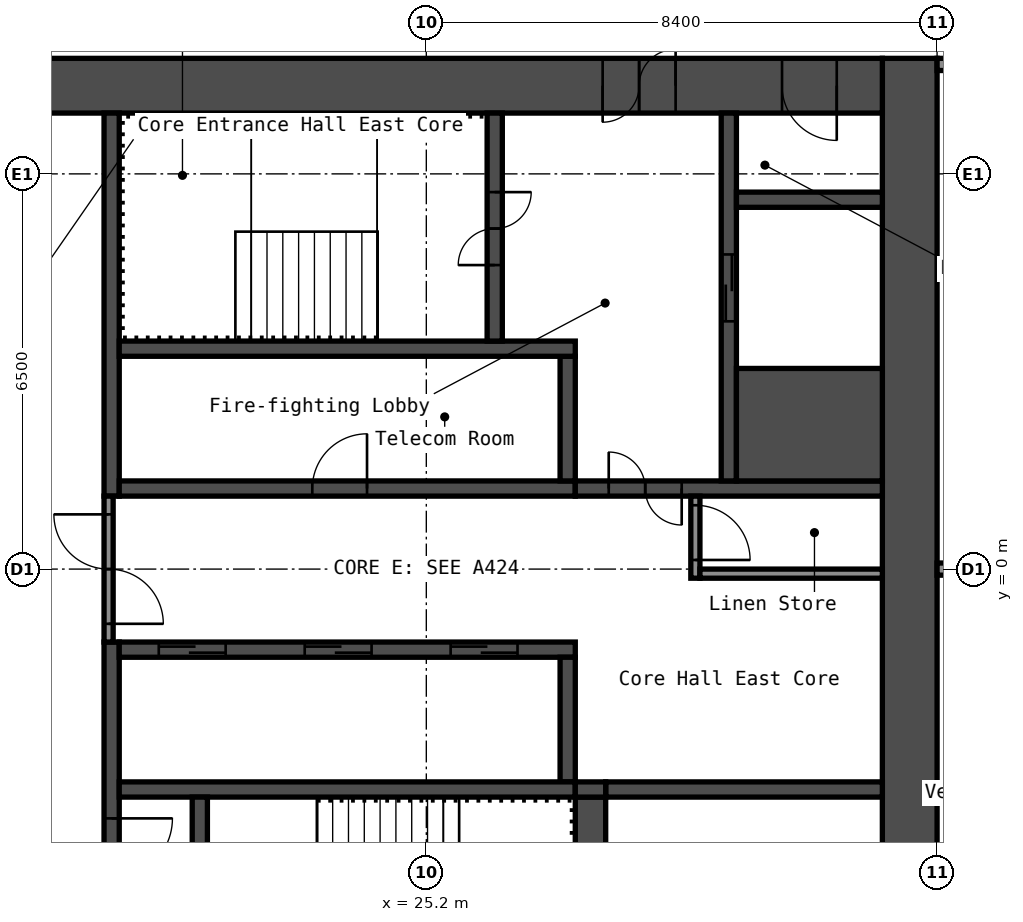
"""IFC4 building model, lengths in metres.
Left out: names, types, materials, properties, quantities, classifications, styles, units other than length and angle.
Written with IfcOpenShell. Run it as: python <this file> out.ifc"""

import sys

from ifc_helpers import new_model, si_unit, direction, frame, frame_2d, origin, place, context, subcontext, project, spatial, rectangle, extrude, element, fill, save


model = new_model("IFC4")
c1 = context("Model", 3, precision=1e-05, world=origin(), true_north=direction((0.0, 1.0)))
c2 = subcontext(c1, "Body", "Model", "MODEL_VIEW")
j1 = project(units=[si_unit("LENGTHUNIT", "METRE"), si_unit("PLANEANGLEUNIT", "RADIAN")], contexts=[c1])
p1 = place(None, origin())
s1 = spatial("IfcSite", under=j1, at=p1, CompositionType="ELEMENT")
p2 = place(p1, origin())
s2 = spatial("IfcBuilding", under=s1, at=p2, CompositionType="ELEMENT")
p3 = place(p2, frame((0.0, 0.0, 169.4)))
s3 = spatial("IfcBuildingStorey", under=s2, at=p3, CompositionType="ELEMENT", Elevation=169.4)
p4 = place(p3, frame((33.15, -8.4, 0.0), z_axis=(0.0, 0.0, 1.0), x_axis=(0.0, 1.0, 0.0)))
e1 = element("IfcWall", 1, at=p4, inside=s3, PredefinedType="SHEAR", context=c2, shape_type="SweptSolid", body=[
    extrude(rectangle(XDim=16.8, YDim=0.9, at=frame_2d((8.4, 0.0))), origin(), (0.0, 0.0, 1.0), 2.75),
])
p5 = place(p3, frame((17.7, 7.95, 0.0), z_axis=(0.0, 0.0, 1.0), x_axis=(1.0, 0.0, 0.0)))
e2 = element("IfcWall", 2, at=p5, inside=s3, PredefinedType="SHEAR", context=c2, shape_type="SweptSolid", body=[
    extrude(rectangle(XDim=15.0, YDim=0.9, at=frame_2d((7.5, 0.0))), origin(), (0.0, 0.0, 1.0), 2.75),
])
p6 = place(p5, frame((10.4, 0.0, 0.0)))
e3 = element("IfcOpeningElement", 3, at=p6, cuts=e2, PredefinedType="OPENING", context=c2, shape_type="SweptSolid", body=[
    extrude(rectangle(XDim=1.2, YDim=2.1, at=frame_2d((0.6, 1.05))), frame((0.0, 0.46, 0.0), z_axis=(0.0, -1.0, 0.0), x_axis=(1.0, 0.0, 0.0)), (0.0, 0.0, 1.0), 0.92),
])
p7 = place(p5, frame((13.35, 0.0, 0.0)))
e4 = element("IfcOpeningElement", 4, at=p7, cuts=e2, PredefinedType="OPENING", context=c2, shape_type="SweptSolid", body=[
    extrude(rectangle(XDim=0.9, YDim=2.1, at=frame_2d((0.45, 1.05))), frame((0.0, 0.46, 0.0), z_axis=(0.0, -1.0, 0.0), x_axis=(1.0, 0.0, 0.0)), (0.0, 0.0, 1.0), 0.92),
])
p8 = place(p3, frame((20.025, 1.2, 0.0), z_axis=(0.0, 0.0, 1.0), x_axis=(0.0, 1.0, 0.0)))
e5 = element("IfcWall", 5, at=p8, inside=s3, PredefinedType="SHEAR", context=c2, shape_type="SweptSolid", body=[
    extrude(rectangle(XDim=6.3, YDim=0.25, at=frame_2d((3.15, 0.0))), origin(), (0.0, 0.0, 1.0), 2.75),
])
p9 = place(p3, frame((20.025, -7.5, 0.0), z_axis=(0.0, 0.0, 1.0), x_axis=(0.0, 1.0, 0.0)))
e6 = element("IfcWall", 6, at=p9, inside=s3, PredefinedType="SHEAR", context=c2, shape_type="SweptSolid", body=[
    extrude(rectangle(XDim=6.3, YDim=0.25, at=frame_2d((3.15, 0.0))), origin(), (0.0, 0.0, 1.0), 2.75),
])
p10 = place(p9, frame((2.4, 0.0, 0.0)))
e7 = element("IfcOpeningElement", 7, at=p10, cuts=e6, PredefinedType="OPENING", context=c2, shape_type="SweptSolid", body=[
    extrude(rectangle(XDim=1.0, YDim=2.1, at=frame_2d((0.5, 1.05))), frame((0.0, 0.135, 0.0), z_axis=(0.0, -1.0, 0.0), x_axis=(1.0, 0.0, 0.0)), (0.0, 0.0, 1.0), 0.27),
])
p11 = place(p3, frame((20.15, 1.325, 0.0), z_axis=(0.0, 0.0, 1.0), x_axis=(1.0, 0.0, 0.0)))
e8 = element("IfcWall", 8, at=p11, inside=s3, PredefinedType="SHEAR", context=c2, shape_type="SweptSolid", body=[
    extrude(rectangle(XDim=7.5, YDim=0.25, at=frame_2d((3.75, 0.0))), origin(), (0.0, 0.0, 1.0), 2.75),
])
p12 = place(p11, frame((3.175, 0.0, 0.0)))
e9 = element("IfcOpeningElement", 9, at=p12, cuts=e8, PredefinedType="OPENING", context=c2, shape_type="SweptSolid", body=[
    extrude(rectangle(XDim=0.9, YDim=2.1, at=frame_2d((0.45, 1.05))), frame((0.0, 0.135, 0.0), z_axis=(0.0, -1.0, 0.0), x_axis=(1.0, 0.0, 0.0)), (0.0, 0.0, 1.0), 0.27),
])
p13 = place(p3, frame((27.525, 1.45, 0.0), z_axis=(0.0, 0.0, 1.0), x_axis=(0.0, 1.0, 0.0)))
e10 = element("IfcWall", 10, at=p13, inside=s3, PredefinedType="SHEAR", context=c2, shape_type="SweptSolid", body=[
    extrude(rectangle(XDim=2.05, YDim=0.25, at=frame_2d((1.025, 0.0))), origin(), (0.0, 0.0, 1.0), 2.75),
])
p14 = place(p3, frame((20.15, 3.625, 0.0), z_axis=(0.0, 0.0, 1.0), x_axis=(1.0, 0.0, 0.0)))
e11 = element("IfcWall", 11, at=p14, inside=s3, PredefinedType="SHEAR", context=c2, shape_type="SweptSolid", body=[
    extrude(rectangle(XDim=7.5, YDim=0.25, at=frame_2d((3.75, 0.0))), origin(), (0.0, 0.0, 1.0), 2.75),
])
p15 = place(p3, frame((26.325, 3.75, 0.0), z_axis=(0.0, 0.0, 1.0), x_axis=(0.0, 1.0, 0.0)))
e12 = element("IfcWall", 12, at=p15, inside=s3, PredefinedType="SHEAR", context=c2, shape_type="SweptSolid", body=[
    extrude(rectangle(XDim=3.75, YDim=0.25, at=frame_2d((1.875, 0.0))), origin(), (0.0, 0.0, 1.0), 2.75),
])
p16 = place(p15, frame((1.25, 0.0, 0.0)))
e13 = element("IfcOpeningElement", 13, at=p16, cuts=e12, PredefinedType="OPENING", context=c2, shape_type="SweptSolid", body=[
    extrude(rectangle(XDim=1.2, YDim=2.1, at=frame_2d((0.6, 1.05))), frame((0.0, 0.135, 0.0), z_axis=(0.0, -1.0, 0.0), x_axis=(1.0, 0.0, 0.0)), (0.0, 0.0, 1.0), 0.27),
])
p17 = place(p3, frame((27.65, 1.325, 0.0), z_axis=(0.0, 0.0, 1.0), x_axis=(1.0, 0.0, 0.0)))
e14 = element("IfcWall", 14, at=p17, inside=s3, PredefinedType="SHEAR", context=c2, shape_type="SweptSolid", body=[
    extrude(rectangle(XDim=5.05, YDim=0.25, at=frame_2d((2.525, 0.0))), origin(), (0.0, 0.0, 1.0), 2.75),
])
p18 = place(p17, frame((0.55, 0.0, 0.0)))
e15 = element("IfcOpeningElement", 15, at=p18, cuts=e14, PredefinedType="OPENING", context=c2, shape_type="SweptSolid", body=[
    extrude(rectangle(XDim=1.2, YDim=2.1, at=frame_2d((0.6, 1.05))), frame((0.0, 0.135, 0.0), z_axis=(0.0, -1.0, 0.0), x_axis=(1.0, 0.0, 0.0)), (0.0, 0.0, 1.0), 0.27),
])
p19 = place(p3, frame((30.175, 1.45, 0.0), z_axis=(0.0, 0.0, 1.0), x_axis=(0.0, 1.0, 0.0)))
e16 = element("IfcWall", 16, at=p19, inside=s3, PredefinedType="SHEAR", context=c2, shape_type="SweptSolid", body=[
    extrude(rectangle(XDim=6.05, YDim=0.25, at=frame_2d((3.025, 0.0))), origin(), (0.0, 0.0, 1.0), 2.75),
])
p20 = place(p19, frame((2.625, 0.0, 0.0)))
e17 = element("IfcOpeningElement", 17, at=p20, cuts=e16, PredefinedType="OPENING", context=c2, shape_type="SweptSolid", body=[
    extrude(rectangle(XDim=1.1, YDim=2.1, at=frame_2d((0.55, 1.05))), frame((0.0, 0.135, 0.0), z_axis=(0.0, -1.0, 0.0), x_axis=(1.0, 0.0, 0.0)), (0.0, 0.0, 1.0), 0.27),
])
p21 = place(p3, frame((30.3, 2.375, 0.0), z_axis=(0.0, 0.0, 1.0), x_axis=(1.0, 0.0, 0.0)))
e18 = element("IfcWall", 18, at=p21, inside=s3, PredefinedType="SHEAR", context=c2, shape_type="SweptSolid", body=[
    extrude(rectangle(XDim=2.4, YDim=1.85, at=frame_2d((1.2, 0.0))), origin(), (0.0, 0.0, 1.0), 2.75),
])
p22 = place(p3, frame((30.3, 6.075, 0.0), z_axis=(0.0, 0.0, 1.0), x_axis=(1.0, 0.0, 0.0)))
e19 = element("IfcWall", 19, at=p22, inside=s3, PredefinedType="SHEAR", context=c2, shape_type="SweptSolid", body=[
    extrude(rectangle(XDim=2.4, YDim=0.25, at=frame_2d((1.2, 0.0))), origin(), (0.0, 0.0, 1.0), 2.75),
])
p23 = place(p3, frame((20.15, -1.325, 0.0), z_axis=(0.0, 0.0, 1.0), x_axis=(1.0, 0.0, 0.0)))
e20 = element("IfcWall", 20, at=p23, inside=s3, PredefinedType="SHEAR", context=c2, shape_type="SweptSolid", body=[
    extrude(rectangle(XDim=7.5, YDim=0.25, at=frame_2d((3.75, 0.0))), origin(), (0.0, 0.0, 1.0), 2.75),
])
p24 = place(p23, frame((0.65, 0.0, 0.0)))
e21 = element("IfcOpeningElement", 21, at=p24, cuts=e20, PredefinedType="OPENING", context=c2, shape_type="SweptSolid", body=[
    extrude(rectangle(XDim=1.1, YDim=2.1, at=frame_2d((0.55, 1.05))), frame((0.0, 0.135, 0.0), z_axis=(0.0, -1.0, 0.0), x_axis=(1.0, 0.0, 0.0)), (0.0, 0.0, 1.0), 0.27),
])
p25 = place(p23, frame((3.05, 0.0, 0.0)))
e22 = element("IfcOpeningElement", 22, at=p25, cuts=e20, PredefinedType="OPENING", context=c2, shape_type="SweptSolid", body=[
    extrude(rectangle(XDim=1.1, YDim=2.1, at=frame_2d((0.55, 1.05))), frame((0.0, 0.135, 0.0), z_axis=(0.0, -1.0, 0.0), x_axis=(1.0, 0.0, 0.0)), (0.0, 0.0, 1.0), 0.27),
])
p26 = place(p23, frame((5.45, 0.0, 0.0)))
e23 = element("IfcOpeningElement", 23, at=p26, cuts=e20, PredefinedType="OPENING", context=c2, shape_type="SweptSolid", body=[
    extrude(rectangle(XDim=1.1, YDim=2.1, at=frame_2d((0.55, 1.05))), frame((0.0, 0.135, 0.0), z_axis=(0.0, -1.0, 0.0), x_axis=(1.0, 0.0, 0.0)), (0.0, 0.0, 1.0), 0.27),
])
p27 = place(p3, frame((27.525, -3.5, 0.0), z_axis=(0.0, 0.0, 1.0), x_axis=(0.0, 1.0, 0.0)))
e24 = element("IfcWall", 24, at=p27, inside=s3, PredefinedType="SHEAR", context=c2, shape_type="SweptSolid", body=[
    extrude(rectangle(XDim=2.05, YDim=0.25, at=frame_2d((1.025, 0.0))), origin(), (0.0, 0.0, 1.0), 2.75),
])
p28 = place(p3, frame((20.15, -3.625, 0.0), z_axis=(0.0, 0.0, 1.0), x_axis=(1.0, 0.0, 0.0)))
e25 = element("IfcWall", 25, at=p28, inside=s3, PredefinedType="SHEAR", context=c2, shape_type="SweptSolid", body=[
    extrude(rectangle(XDim=7.5, YDim=0.25, at=frame_2d((3.75, 0.0))), origin(), (0.0, 0.0, 1.0), 2.75),
])
p29 = place(p3, frame((21.475, -7.5, 0.0), z_axis=(0.0, 0.0, 1.0), x_axis=(0.0, 1.0, 0.0)))
e26 = element("IfcWall", 26, at=p29, inside=s3, PredefinedType="SHEAR", context=c2, shape_type="SweptSolid", body=[
    extrude(rectangle(XDim=3.75, YDim=0.25, at=frame_2d((1.875, 0.0))), origin(), (0.0, 0.0, 1.0), 2.75),
])
p30 = place(p29, frame((1.3, 0.0, 0.0)))
e27 = element("IfcOpeningElement", 27, at=p30, cuts=e26, PredefinedType="OPENING", context=c2, shape_type="SweptSolid", body=[
    extrude(rectangle(XDim=1.2, YDim=2.1, at=frame_2d((0.6, 1.05))), frame((0.0, 0.135, 0.0), z_axis=(0.0, -1.0, 0.0), x_axis=(1.0, 0.0, 0.0)), (0.0, 0.0, 1.0), 0.27),
])
p31 = place(p3, frame((27.9, -7.5, 0.0), z_axis=(0.0, 0.0, 1.0), x_axis=(0.0, 1.0, 0.0)))
e28 = element("IfcWall", 28, at=p31, inside=s3, PredefinedType="SHEAR", context=c2, shape_type="SweptSolid", body=[
    extrude(rectangle(XDim=3.75, YDim=0.5, at=frame_2d((1.875, 0.0))), origin(), (0.0, 0.0, 1.0), 2.75),
])
p32 = place(p3, frame((28.15, -3.625, 0.0), z_axis=(0.0, 0.0, 1.0), x_axis=(1.0, 0.0, 0.0)))
e29 = element("IfcWall", 29, at=p32, inside=s3, PredefinedType="SHEAR", context=c2, shape_type="SweptSolid", body=[
    extrude(rectangle(XDim=4.55, YDim=0.25, at=frame_2d((2.275, 0.0))), origin(), (0.0, 0.0, 1.0), 2.75),
])
p33 = place(p3, frame((27.65, -3.625, 0.0), z_axis=(0.0, 0.0, 1.0), x_axis=(1.0, 0.0, 0.0)))
e30 = element("IfcWall", 30, at=p33, inside=s3, PredefinedType="SHEAR", context=c2, shape_type="SweptSolid", body=[
    extrude(rectangle(XDim=0.5, YDim=0.25, at=frame_2d((0.25, 0.0))), origin(), (0.0, 0.0, 1.0), 2.75),
])
p34 = place(p3, frame((19.975, -1.2, 0.0), z_axis=(0.0, 0.0, 1.0), x_axis=(0.0, 1.0, 0.0)))
e31 = element("IfcWall", 31, at=p34, inside=s3, PredefinedType="PARTITIONING", context=c2, shape_type="SweptSolid", body=[
    extrude(rectangle(XDim=2.4, YDim=0.15, at=frame_2d((1.2, 0.0))), origin(), (0.0, 0.0, 1.0), 2.75),
])
p35 = place(p34, frame((0.3, 0.0, 0.0)))
e32 = element("IfcOpeningElement", 32, at=p35, cuts=e31, PredefinedType="OPENING", context=c2, shape_type="SweptSolid", body=[
    extrude(rectangle(XDim=1.8, YDim=2.1, at=frame_2d((0.9, 1.05))), frame((0.0, 0.085, 0.0), z_axis=(0.0, -1.0, 0.0), x_axis=(1.0, 0.0, 0.0)), (0.0, 0.0, 1.0), 0.17),
])
p36 = place(p3, frame((29.625, -0.15, 0.0), z_axis=(0.0, 0.0, 1.0), x_axis=(0.0, 1.0, 0.0)))
e33 = element("IfcWall", 33, at=p36, inside=s3, PredefinedType="PARTITIONING", context=c2, shape_type="SweptSolid", body=[
    extrude(rectangle(XDim=1.35, YDim=0.15, at=frame_2d((0.675, 0.0))), origin(), (0.0, 0.0, 1.0), 2.75),
])
p37 = place(p36, frame((0.3, 0.0, 0.0)))
e34 = element("IfcOpeningElement", 34, at=p37, cuts=e33, PredefinedType="OPENING", context=c2, shape_type="SweptSolid", body=[
    extrude(rectangle(XDim=0.9, YDim=2.1, at=frame_2d((0.45, 1.05))), frame((0.0, 0.085, 0.0), z_axis=(0.0, -1.0, 0.0), x_axis=(1.0, 0.0, 0.0)), (0.0, 0.0, 1.0), 0.17),
])
p38 = place(p3, frame((29.7, -0.075, 0.0), z_axis=(0.0, 0.0, 1.0), x_axis=(1.0, 0.0, 0.0)))
e35 = element("IfcWall", 35, at=p38, inside=s3, PredefinedType="PARTITIONING", context=c2, shape_type="SweptSolid", body=[
    extrude(rectangle(XDim=3.0, YDim=0.15, at=frame_2d((1.5, 0.0))), origin(), (0.0, 0.0, 1.0), 2.75),
])
p39 = place(p3, frame((33.6, 0.0, 0.0), z_axis=(0.0, 0.0, 1.0), x_axis=(1.0, 0.0, 0.0)))
e36 = element("IfcWall", 36, at=p39, inside=s3, PredefinedType="PARTITIONING", context=c2, shape_type="SweptSolid", body=[
    extrude(rectangle(XDim=6.5, YDim=0.2, at=frame_2d((3.25, 0.0))), origin(), (0.0, 0.0, 1.0), 2.75),
])
p40 = place(p3, frame((33.6, 8.3, 0.0), z_axis=(0.0, 0.0, 1.0), x_axis=(1.0, 0.0, 0.0)))
e37 = element("IfcWall", 37, at=p40, inside=s3, PredefinedType="PARTITIONING", context=c2, shape_type="SweptSolid", body=[
    extrude(rectangle(XDim=6.6, YDim=0.2, at=frame_2d((3.3, 0.0))), origin(), (0.0, 0.0, 1.0), 2.75),
])
p41 = place(p40, frame((1.595, 0.0, 0.0)))
e38 = element("IfcOpeningElement", 38, at=p41, cuts=e37, PredefinedType="OPENING", context=c2, shape_type="SweptSolid", body=[
    extrude(rectangle(XDim=0.9, YDim=2.1, at=frame_2d((0.45, 1.05))), frame((0.0, 0.11, 0.0), z_axis=(0.0, -1.0, 0.0), x_axis=(1.0, 0.0, 0.0)), (0.0, 0.0, 1.0), 0.22),
])
p42 = place(p40, frame((4.895, 0.0, 0.0)))
e39 = element("IfcOpeningElement", 39, at=p42, cuts=e37, PredefinedType="OPENING", context=c2, shape_type="SweptSolid", body=[
    extrude(rectangle(XDim=0.9, YDim=2.1, at=frame_2d((0.45, 1.05))), frame((0.0, 0.11, 0.0), z_axis=(0.0, -1.0, 0.0), x_axis=(1.0, 0.0, 0.0)), (0.0, 0.0, 1.0), 0.22),
])
p43 = place(p6, origin())
e40 = element("IfcDoor", 40, at=p43, inside=s3, OperationType="DOUBLE_DOOR_SINGLE_SWING", PredefinedType="DOOR", context=c2, shape_type="SweptSolid", body=[
    extrude(rectangle(XDim=1.2, YDim=2.1, at=frame_2d((0.6, 1.05))), frame((0.0, 0.025, 0.0), z_axis=(0.0, -1.0, 0.0), x_axis=(1.0, 0.0, 0.0)), (0.0, 0.0, 1.0), 0.05),
])
fill(e3, e40)
p44 = place(p7, origin())
e41 = element("IfcDoor", 41, at=p44, inside=s3, OperationType="SINGLE_SWING_RIGHT", PredefinedType="DOOR", context=c2, shape_type="SweptSolid", body=[
    extrude(rectangle(XDim=0.9, YDim=2.1, at=frame_2d((0.45, 1.05))), frame((0.0, 0.025, 0.0), z_axis=(0.0, -1.0, 0.0), x_axis=(1.0, 0.0, 0.0)), (0.0, 0.0, 1.0), 0.05),
])
fill(e4, e41)
p45 = place(p16, origin())
e42 = element("IfcDoor", 42, at=p45, inside=s3, OperationType="DOUBLE_DOOR_SINGLE_SWING", PredefinedType="DOOR", context=c2, shape_type="SweptSolid", body=[
    extrude(rectangle(XDim=1.2, YDim=2.1, at=frame_2d((0.6, 1.05))), frame((0.0, 0.025, 0.0), z_axis=(0.0, -1.0, 0.0), x_axis=(1.0, 0.0, 0.0)), (0.0, 0.0, 1.0), 0.05),
])
fill(e13, e42)
p46 = place(p10, origin())
e43 = element("IfcDoor", 43, at=p46, inside=s3, OperationType="SINGLE_SWING_RIGHT", PredefinedType="DOOR", context=c2, shape_type="SweptSolid", body=[
    extrude(rectangle(XDim=1.0, YDim=2.1, at=frame_2d((0.5, 1.05))), frame((0.0, 0.025, 0.0), z_axis=(0.0, -1.0, 0.0), x_axis=(1.0, 0.0, 0.0)), (0.0, 0.0, 1.0), 0.05),
])
fill(e7, e43)
p47 = place(p18, origin())
e44 = element("IfcDoor", 44, at=p47, inside=s3, OperationType="DOUBLE_DOOR_SINGLE_SWING", PredefinedType="DOOR", context=c2, shape_type="SweptSolid", body=[
    extrude(rectangle(XDim=1.2, YDim=2.1, at=frame_2d((0.6, 1.05))), frame((0.0, 0.025, 0.0), z_axis=(0.0, -1.0, 0.0), x_axis=(1.0, 0.0, 0.0)), (0.0, 0.0, 1.0), 0.05),
])
fill(e15, e44)
p48 = place(p35, origin())
e45 = element("IfcDoor", 45, at=p48, inside=s3, OperationType="DOUBLE_DOOR_SINGLE_SWING", PredefinedType="DOOR", context=c2, shape_type="SweptSolid", body=[
    extrude(rectangle(XDim=1.8, YDim=2.1, at=frame_2d((0.9, 1.05))), frame((0.0, 0.025, 0.0), z_axis=(0.0, -1.0, 0.0), x_axis=(1.0, 0.0, 0.0)), (0.0, 0.0, 1.0), 0.05),
])
fill(e32, e45)
p49 = place(p37, origin())
e46 = element("IfcDoor", 46, at=p49, inside=s3, OperationType="SINGLE_SWING_LEFT", PredefinedType="DOOR", context=c2, shape_type="SweptSolid", body=[
    extrude(rectangle(XDim=0.9, YDim=2.1, at=frame_2d((0.45, 1.05))), frame((0.0, 0.025, 0.0), z_axis=(0.0, -1.0, 0.0), x_axis=(1.0, 0.0, 0.0)), (0.0, 0.0, 1.0), 0.05),
])
fill(e34, e46)
p50 = place(p12, origin())
e47 = element("IfcDoor", 47, at=p50, inside=s3, OperationType="SINGLE_SWING_LEFT", PredefinedType="DOOR", context=c2, shape_type="SweptSolid", body=[
    extrude(rectangle(XDim=0.9, YDim=2.1, at=frame_2d((0.45, 1.05))), frame((0.0, 0.025, 0.0), z_axis=(0.0, -1.0, 0.0), x_axis=(1.0, 0.0, 0.0)), (0.0, 0.0, 1.0), 0.05),
])
fill(e9, e47)
p51 = place(p24, origin())
e48 = element("IfcDoor", 48, at=p51, inside=s3, OperationType="DOUBLE_DOOR_SLIDING", PredefinedType="DOOR", context=c2, shape_type="SweptSolid", body=[
    extrude(rectangle(XDim=1.1, YDim=2.1, at=frame_2d((0.55, 1.05))), frame((0.0, 0.025, 0.0), z_axis=(0.0, -1.0, 0.0), x_axis=(1.0, 0.0, 0.0)), (0.0, 0.0, 1.0), 0.05),
])
fill(e21, e48)
p52 = place(p25, origin())
e49 = element("IfcDoor", 49, at=p52, inside=s3, OperationType="DOUBLE_DOOR_SLIDING", PredefinedType="DOOR", context=c2, shape_type="SweptSolid", body=[
    extrude(rectangle(XDim=1.1, YDim=2.1, at=frame_2d((0.55, 1.05))), frame((0.0, 0.025, 0.0), z_axis=(0.0, -1.0, 0.0), x_axis=(1.0, 0.0, 0.0)), (0.0, 0.0, 1.0), 0.05),
])
fill(e22, e49)
p53 = place(p26, origin())
e50 = element("IfcDoor", 50, at=p53, inside=s3, OperationType="DOUBLE_DOOR_SLIDING", PredefinedType="DOOR", context=c2, shape_type="SweptSolid", body=[
    extrude(rectangle(XDim=1.1, YDim=2.1, at=frame_2d((0.55, 1.05))), frame((0.0, 0.025, 0.0), z_axis=(0.0, -1.0, 0.0), x_axis=(1.0, 0.0, 0.0)), (0.0, 0.0, 1.0), 0.05),
])
fill(e23, e50)
p54 = place(p20, origin())
e51 = element("IfcDoor", 51, at=p54, inside=s3, OperationType="DOUBLE_DOOR_SLIDING", PredefinedType="DOOR", context=c2, shape_type="SweptSolid", body=[
    extrude(rectangle(XDim=1.1, YDim=2.1, at=frame_2d((0.55, 1.05))), frame((0.0, 0.025, 0.0), z_axis=(0.0, -1.0, 0.0), x_axis=(1.0, 0.0, 0.0)), (0.0, 0.0, 1.0), 0.05),
])
fill(e17, e51)
save(model, sys.argv[1])
